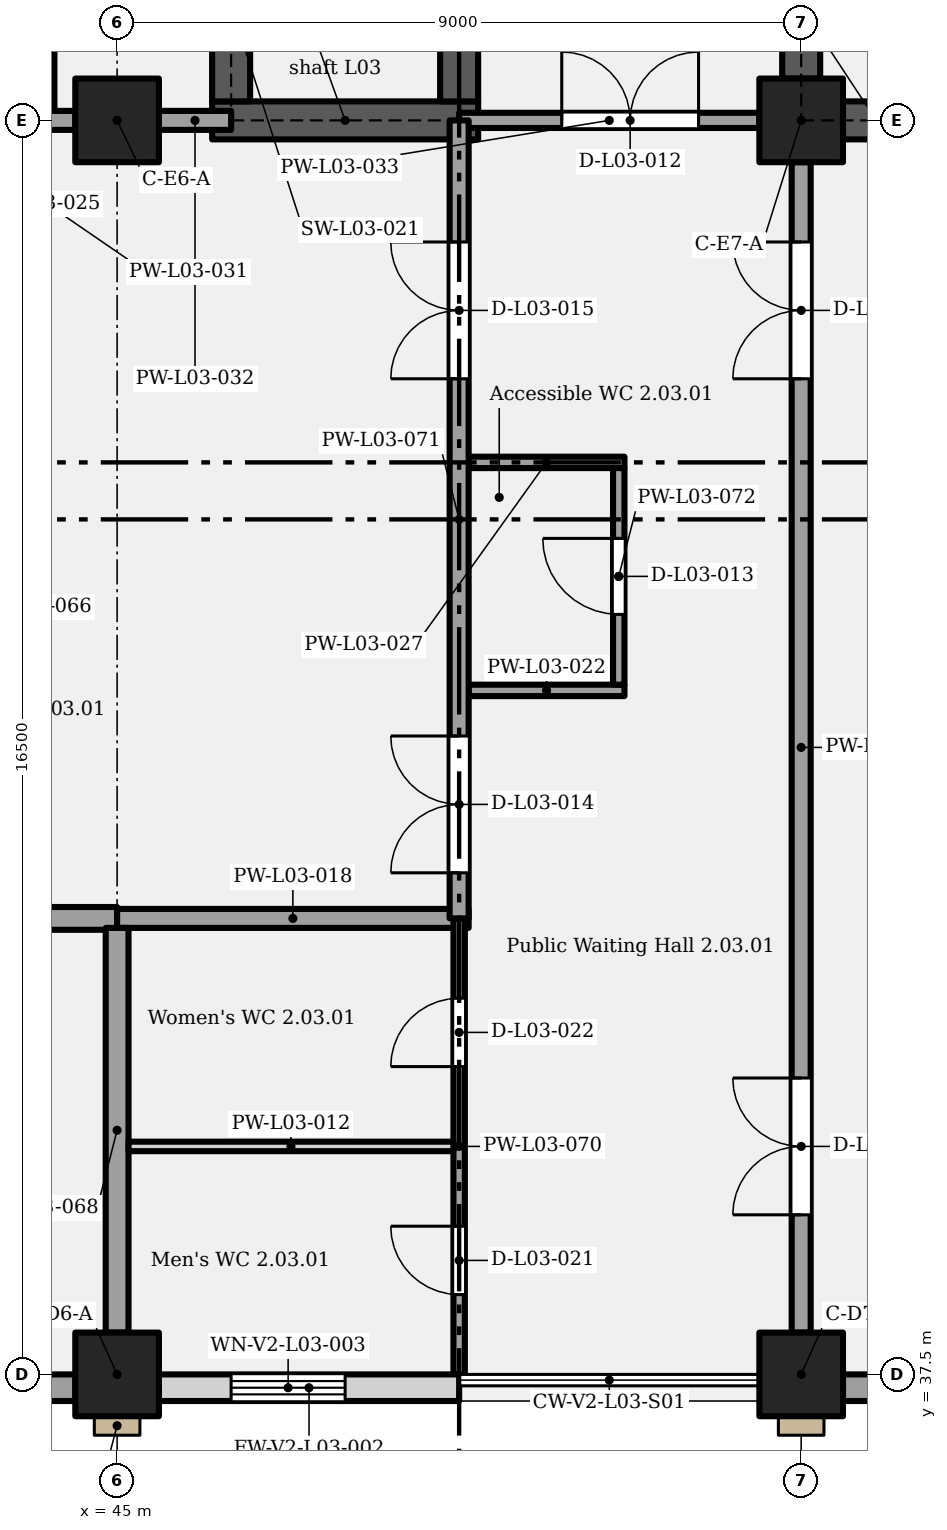
"""IFC4 building model, lengths in metres.
Left out: names, types, materials, properties, quantities, classifications, styles, units other than length and angle.
Written with IfcOpenShell. Run it as: python <this file> out.ifc"""

import sys

from ifc_helpers import new_model, si_unit, direction, frame, frame_2d, origin, origin_2d, place, context, subcontext, project, spatial, rectangle, extrude, element, fill, save


model = new_model("IFC4")
c1 = context("Model", 3, precision=1e-05, world=origin(), true_north=direction((0.0, 1.0)))
c2 = subcontext(c1, "Body", "Model", "MODEL_VIEW")
j1 = project(units=[si_unit("LENGTHUNIT", "METRE"), si_unit("PLANEANGLEUNIT", "RADIAN")], contexts=[c1])
p1 = place(None, origin())
s1 = spatial("IfcSite", under=j1, at=p1, CompositionType="ELEMENT")
p2 = place(p1, origin())
s2 = spatial("IfcBuilding", under=s1, at=p2, CompositionType="ELEMENT")
p3 = place(p2, frame((0.0, 0.0, 17.4)))
s3 = spatial("IfcBuildingStorey", under=s2, at=p3, CompositionType="ELEMENT", Elevation=17.4)
for number, where, z_axis, x_axis in (
    (1, (45.0, 37.5, 0.0), (0.0, 0.0, 1.0), (1.0, 0.0, 0.0)),
    (2, (54.0, 37.5, 0.0), (0.0, 0.0, 1.0), (1.0, 0.0, 0.0)),
    (3, (45.0, 54.0, 0.0), (0.0, 0.0, 1.0), (1.0, 0.0, 0.0)),
    (4, (54.0, 54.0, 0.0), (0.0, 0.0, 1.0), (1.0, 0.0, 0.0)),
):
    element("IfcColumn", number, at=place(p3, frame(where, z_axis=z_axis, x_axis=x_axis)), inside=s3, PredefinedType="COLUMN", context=c2, shape_type="SweptSolid", body=[
        extrude(rectangle(XDim=1.1, YDim=1.1, at=origin_2d()), origin(), (0.0, 0.0, 1.0), 5.4),
    ])
p4 = place(p3, frame((46.25, 54.0, 0.0), z_axis=(0.0, 0.0, 1.0), x_axis=(1.0, 0.0, 0.0)))
e5 = element("IfcWall", 5, at=p4, inside=s3, PredefinedType="SHEAR", context=c2, shape_type="SweptSolid", body=[
    extrude(rectangle(XDim=3.5, YDim=0.5, at=frame_2d((1.75, 0.0))), origin(), (0.0, 0.0, 1.0), 5.15),
])
p5 = place(p3, frame((54.55, 54.0, 0.0), z_axis=(0.0, 0.0, 1.0), x_axis=(1.0, 0.0, 0.0)))
e6 = element("IfcWall", 6, at=p5, inside=s3, PredefinedType="SHEAR", context=c2, shape_type="SweptSolid", body=[
    extrude(rectangle(XDim=2.7, YDim=0.5, at=frame_2d((1.35, 0.0))), origin(), (0.0, 0.0, 1.0), 5.15),
])
p6 = place(p3, frame((46.5, 54.25, 0.0), z_axis=(0.0, 0.0, 1.0), x_axis=(0.0, 1.0, 0.0)))
e7 = element("IfcWall", 7, at=p6, inside=s3, PredefinedType="SHEAR", context=c2, shape_type="SweptSolid", body=[
    extrude(rectangle(XDim=2.5, YDim=0.5, at=frame_2d((1.25, 0.0))), origin(), (0.0, 0.0, 1.0), 5.15),
])
p7 = place(p3, frame((49.5, 54.25, 0.0), z_axis=(0.0, 0.0, 1.0), x_axis=(0.0, 1.0, 0.0)))
e8 = element("IfcWall", 8, at=p7, inside=s3, PredefinedType="SHEAR", context=c2, shape_type="SweptSolid", body=[
    extrude(rectangle(XDim=11.5, YDim=0.5, at=frame_2d((5.75, 0.0))), origin(), (0.0, 0.0, 1.0), 5.15),
])
p8 = place(p7, frame((0.7, 0.0, 0.0)))
e9 = element("IfcOpeningElement", 9, at=p8, cuts=e8, PredefinedType="OPENING", context=c2, shape_type="SweptSolid", body=[
    extrude(rectangle(XDim=1.1, YDim=2.1, at=frame_2d((0.55, 1.05))), frame((0.0, 0.26, 0.0), z_axis=(0.0, -1.0, 0.0), x_axis=(1.0, 0.0, 0.0)), (0.0, 0.0, 1.0), 0.52),
])
p9 = place(p7, frame((4.35, 0.0, 0.0), z_axis=(0.0, 0.0, 1.0), x_axis=(-1.0, 0.0, 0.0)))
e10 = element("IfcOpeningElement", 10, at=p9, cuts=e8, PredefinedType="OPENING", context=c2, shape_type="SweptSolid", body=[
    extrude(rectangle(XDim=1.2, YDim=2.1, at=frame_2d((0.6, 1.05))), frame((0.0, 0.26, 0.0), z_axis=(0.0, -1.0, 0.0), x_axis=(1.0, 0.0, 0.0)), (0.0, 0.0, 1.0), 0.52),
])
p10 = place(p3, frame((54.0, 54.55, 0.0), z_axis=(0.0, 0.0, 1.0), x_axis=(0.0, 1.0, 0.0)))
e11 = element("IfcWall", 11, at=p10, inside=s3, PredefinedType="SHEAR", context=c2, shape_type="SweptSolid", body=[
    extrude(rectangle(XDim=11.0, YDim=0.5, at=frame_2d((5.5, 0.0))), origin(), (0.0, 0.0, 1.0), 5.15),
])
p11 = place(p10, frame((0.4, 0.0, 0.0)))
e12 = element("IfcOpeningElement", 12, at=p11, cuts=e11, PredefinedType="OPENING", context=c2, shape_type="SweptSolid", body=[
    extrude(rectangle(XDim=1.1, YDim=2.1, at=frame_2d((0.55, 1.05))), frame((0.0, 0.26, 0.0), z_axis=(0.0, -1.0, 0.0), x_axis=(1.0, 0.0, 0.0)), (0.0, 0.0, 1.0), 0.52),
])
p12 = place(p10, frame((2.85, 0.0, 0.0)))
e13 = element("IfcOpeningElement", 13, at=p12, cuts=e11, PredefinedType="OPENING", context=c2, shape_type="SweptSolid", body=[
    extrude(rectangle(XDim=1.2, YDim=2.1, at=frame_2d((0.6, 1.05))), frame((0.0, 0.26, 0.0), z_axis=(0.0, -1.0, 0.0), x_axis=(1.0, 0.0, 0.0)), (0.0, 0.0, 1.0), 0.52),
])
p13 = place(p3, frame((36.55, 37.325, 0.0), z_axis=(0.0, 0.0, 1.0), x_axis=(1.0, 0.0, 0.0)))
e14 = element("IfcWall", 14, at=p13, inside=s3, PredefinedType="SOLIDWALL", context=c2, shape_type="SweptSolid", body=[
    extrude(rectangle(XDim=7.9, YDim=0.35, at=frame_2d((3.95, 0.0))), origin(), (0.0, 0.0, 1.0), 5.15),
])
p14 = place(p13, frame((0.95, 0.0, 1.05)))
e15 = element("IfcOpeningElement", 15, at=p14, cuts=e14, PredefinedType="OPENING", context=c2, shape_type="SweptSolid", body=[
    extrude(rectangle(XDim=1.5, YDim=3.5, at=frame_2d((0.75, 1.75))), frame((0.0, 0.185, 0.0), z_axis=(0.0, -1.0, 0.0), x_axis=(1.0, 0.0, 0.0)), (0.0, 0.0, 1.0), 0.37),
])
p15 = place(p13, frame((5.45, 0.0, 1.05)))
e16 = element("IfcOpeningElement", 16, at=p15, cuts=e14, PredefinedType="OPENING", context=c2, shape_type="SweptSolid", body=[
    extrude(rectangle(XDim=1.5, YDim=3.5, at=frame_2d((0.75, 1.75))), frame((0.0, 0.185, 0.0), z_axis=(0.0, -1.0, 0.0), x_axis=(1.0, 0.0, 0.0)), (0.0, 0.0, 1.0), 0.37),
])
p16 = place(p3, frame((45.55, 37.325, 0.0), z_axis=(0.0, 0.0, 1.0), x_axis=(1.0, 0.0, 0.0)))
e17 = element("IfcWall", 17, at=p16, inside=s3, PredefinedType="SOLIDWALL", context=c2, shape_type="SweptSolid", body=[
    extrude(rectangle(XDim=3.95, YDim=0.35, at=frame_2d((1.975, 0.0))), origin(), (0.0, 0.0, 1.0), 5.15),
])
p17 = place(p16, frame((0.95, 0.0, 1.05)))
e18 = element("IfcOpeningElement", 18, at=p17, cuts=e17, PredefinedType="OPENING", context=c2, shape_type="SweptSolid", body=[
    extrude(rectangle(XDim=1.5, YDim=3.5, at=frame_2d((0.75, 1.75))), frame((0.0, 0.185, 0.0), z_axis=(0.0, -1.0, 0.0), x_axis=(1.0, 0.0, 0.0)), (0.0, 0.0, 1.0), 0.37),
])
p18 = place(p3, frame((54.55, 37.325, 0.0), z_axis=(0.0, 0.0, 1.0), x_axis=(1.0, 0.0, 0.0)))
e19 = element("IfcWall", 19, at=p18, inside=s3, PredefinedType="SOLIDWALL", context=c2, shape_type="SweptSolid", body=[
    extrude(rectangle(XDim=7.9, YDim=0.35, at=frame_2d((3.95, 0.0))), origin(), (0.0, 0.0, 1.0), 5.15),
])
p19 = place(p18, frame((0.95, 0.0, 1.05)))
e20 = element("IfcOpeningElement", 20, at=p19, cuts=e19, PredefinedType="OPENING", context=c2, shape_type="SweptSolid", body=[
    extrude(rectangle(XDim=1.5, YDim=3.5, at=frame_2d((0.75, 1.75))), frame((0.0, 0.185, 0.0), z_axis=(0.0, -1.0, 0.0), x_axis=(1.0, 0.0, 0.0)), (0.0, 0.0, 1.0), 0.37),
])
p20 = place(p18, frame((5.45, 0.0, 1.05)))
e21 = element("IfcOpeningElement", 21, at=p20, cuts=e19, PredefinedType="OPENING", context=c2, shape_type="SweptSolid", body=[
    extrude(rectangle(XDim=1.5, YDim=3.5, at=frame_2d((0.75, 1.75))), frame((0.0, 0.185, 0.0), z_axis=(0.0, -1.0, 0.0), x_axis=(1.0, 0.0, 0.0)), (0.0, 0.0, 1.0), 0.37),
])
p21 = place(p3, frame((45.15, 40.5, 0.0), z_axis=(0.0, 0.0, 1.0), x_axis=(1.0, 0.0, 0.0)))
e22 = element("IfcWall", 22, at=p21, inside=s3, PredefinedType="PARTITIONING", context=c2, shape_type="SweptSolid", body=[
    extrude(rectangle(XDim=4.275, YDim=0.125, at=frame_2d((2.138, 0.0))), origin(), (0.0, 0.0, 1.0), 5.15),
])
p22 = place(p3, frame((36.0, 43.5, 0.0), z_axis=(0.0, 0.0, 1.0), x_axis=(1.0, 0.0, 0.0)))
e23 = element("IfcWall", 23, at=p22, inside=s3, PredefinedType="PARTITIONING", context=c2, shape_type="SweptSolid", body=[
    extrude(rectangle(XDim=9.0, YDim=0.3, at=frame_2d((4.5, 0.0))), origin(), (0.0, 0.0, 1.0), 5.15),
])
p23 = place(p22, frame((1.35, 0.0, 0.0), z_axis=(0.0, 0.0, 1.0), x_axis=(-1.0, 0.0, 0.0)))
e24 = element("IfcOpeningElement", 24, at=p23, cuts=e23, PredefinedType="OPENING", context=c2, shape_type="SweptSolid", body=[
    extrude(rectangle(XDim=0.9, YDim=2.1, at=frame_2d((0.45, 1.05))), frame((0.0, 0.16, 0.0), z_axis=(0.0, -1.0, 0.0), x_axis=(1.0, 0.0, 0.0)), (0.0, 0.0, 1.0), 0.32),
])
p24 = place(p3, frame((45.0, 43.5, 0.0), z_axis=(0.0, 0.0, 1.0), x_axis=(1.0, 0.0, 0.0)))
e25 = element("IfcWall", 25, at=p24, inside=s3, PredefinedType="PARTITIONING", context=c2, shape_type="SweptSolid", body=[
    extrude(rectangle(XDim=4.625, YDim=0.25, at=frame_2d((2.312, 0.0))), origin(), (0.0, 0.0, 1.0), 5.15),
])
for number, where, z_axis, x_axis in (
    (26, (49.625, 46.5, 0.0), (0.0, 0.0, 1.0), (1.0, 0.0, 0.0)),
    (27, (49.625, 49.5, 0.0), (0.0, 0.0, 1.0), (1.0, 0.0, 0.0)),
):
    element("IfcWall", number, at=place(p3, frame(where, z_axis=z_axis, x_axis=x_axis)), inside=s3, PredefinedType="PARTITIONING", context=c2, shape_type="SweptSolid", body=[
        extrude(rectangle(XDim=2.05, YDim=0.15, at=frame_2d((1.025, 0.0))), origin(), (0.0, 0.0, 1.0), 5.15),
    ])
p25 = place(p3, frame((40.5, 54.0, 0.0), z_axis=(0.0, 0.0, 1.0), x_axis=(1.0, 0.0, 0.0)))
e28 = element("IfcWall", 28, at=p25, inside=s3, PredefinedType="PARTITIONING", context=c2, shape_type="SweptSolid", body=[
    extrude(rectangle(XDim=3.95, YDim=0.25, at=frame_2d((1.975, 0.0))), origin(), (0.0, 0.0, 1.0), 4.4),
])
p26 = place(p25, frame((2.3, 0.0, 0.0), z_axis=(0.0, 0.0, 1.0), x_axis=(-1.0, 0.0, 0.0)))
e29 = element("IfcOpeningElement", 29, at=p26, cuts=e28, PredefinedType="OPENING", context=c2, shape_type="SweptSolid", body=[
    extrude(rectangle(XDim=1.0, YDim=2.1, at=frame_2d((0.5, 1.05))), frame((0.0, 0.135, 0.0), z_axis=(0.0, -1.0, 0.0), x_axis=(1.0, 0.0, 0.0)), (0.0, 0.0, 1.0), 0.27),
])
p27 = place(p3, frame((45.55, 54.0, 0.0), z_axis=(0.0, 0.0, 1.0), x_axis=(1.0, 0.0, 0.0)))
e30 = element("IfcWall", 30, at=p27, inside=s3, PredefinedType="PARTITIONING", context=c2, shape_type="SweptSolid", body=[
    extrude(rectangle(XDim=0.95, YDim=0.25, at=frame_2d((0.475, 0.0))), origin(), (0.0, 0.0, 1.0), 4.4),
])
p28 = place(p3, frame((49.5, 54.0, 0.0), z_axis=(0.0, 0.0, 1.0), x_axis=(1.0, 0.0, 0.0)))
e31 = element("IfcWall", 31, at=p28, inside=s3, PredefinedType="PARTITIONING", context=c2, shape_type="SweptSolid", body=[
    extrude(rectangle(XDim=3.95, YDim=0.2, at=frame_2d((1.975, 0.0))), origin(), (0.0, 0.0, 1.0), 4.4),
])
p29 = place(p28, frame((1.35, 0.0, 0.0)))
e32 = element("IfcOpeningElement", 32, at=p29, cuts=e31, PredefinedType="OPENING", context=c2, shape_type="SweptSolid", body=[
    extrude(rectangle(XDim=1.8, YDim=2.1, at=frame_2d((0.9, 1.05))), frame((0.0, 0.11, 0.0), z_axis=(0.0, -1.0, 0.0), x_axis=(1.0, 0.0, 0.0)), (0.0, 0.0, 1.0), 0.22),
])
p30 = place(p3, frame((44.1, 54.125, 0.0), z_axis=(0.0, 0.0, 1.0), x_axis=(0.0, 1.0, 0.0)))
e33 = element("IfcWall", 33, at=p30, inside=s3, PredefinedType="PARTITIONING", context=c2, shape_type="SweptSolid", body=[
    extrude(rectangle(XDim=8.8, YDim=0.15, at=frame_2d((4.4, 0.0))), origin(), (0.0, 0.0, 1.0), 5.15),
])
p31 = place(p30, frame((0.875, 0.0, 0.0)))
e34 = element("IfcOpeningElement", 34, at=p31, cuts=e33, PredefinedType="OPENING", context=c2, shape_type="SweptSolid", body=[
    extrude(rectangle(XDim=1.0, YDim=2.1, at=frame_2d((0.5, 1.05))), frame((0.0, 0.085, 0.0), z_axis=(0.0, -1.0, 0.0), x_axis=(1.0, 0.0, 0.0)), (0.0, 0.0, 1.0), 0.17),
])
p32 = place(p30, frame((5.425, 0.0, 0.0)))
e35 = element("IfcOpeningElement", 35, at=p32, cuts=e33, PredefinedType="OPENING", context=c2, shape_type="SweptSolid", body=[
    extrude(rectangle(XDim=0.9, YDim=2.1, at=frame_2d((0.45, 1.05))), frame((0.0, 0.085, 0.0), z_axis=(0.0, -1.0, 0.0), x_axis=(1.0, 0.0, 0.0)), (0.0, 0.0, 1.0), 0.17),
])
p33 = place(p3, frame((45.0, 38.05, 0.0), z_axis=(0.0, 0.0, 1.0), x_axis=(0.0, 1.0, 0.0)))
e36 = element("IfcWall", 36, at=p33, inside=s3, PredefinedType="PARTITIONING", context=c2, shape_type="SweptSolid", body=[
    extrude(rectangle(XDim=5.325, YDim=0.3, at=frame_2d((2.663, 0.0))), origin(), (0.0, 0.0, 1.0), 4.2),
])
p34 = place(p3, frame((49.5, 37.5, 0.0), z_axis=(0.0, 0.0, 1.0), x_axis=(0.0, 1.0, 0.0)))
e37 = element("IfcWall", 37, at=p34, inside=s3, PredefinedType="PARTITIONING", context=c2, shape_type="SweptSolid", body=[
    extrude(rectangle(XDim=6.0, YDim=0.15, at=frame_2d((3.0, 0.0))), origin(), (0.0, 0.0, 1.0), 5.15),
])
p35 = place(p34, frame((1.05, 0.0, 0.0)))
e38 = element("IfcOpeningElement", 38, at=p35, cuts=e37, PredefinedType="OPENING", context=c2, shape_type="SweptSolid", body=[
    extrude(rectangle(XDim=0.9, YDim=2.1, at=frame_2d((0.45, 1.05))), frame((0.0, 0.085, 0.0), z_axis=(0.0, -1.0, 0.0), x_axis=(1.0, 0.0, 0.0)), (0.0, 0.0, 1.0), 0.17),
])
p36 = place(p34, frame((4.05, 0.0, 0.0)))
e39 = element("IfcOpeningElement", 39, at=p36, cuts=e37, PredefinedType="OPENING", context=c2, shape_type="SweptSolid", body=[
    extrude(rectangle(XDim=0.9, YDim=2.1, at=frame_2d((0.45, 1.05))), frame((0.0, 0.085, 0.0), z_axis=(0.0, -1.0, 0.0), x_axis=(1.0, 0.0, 0.0)), (0.0, 0.0, 1.0), 0.17),
])
p37 = place(p3, frame((49.5, 43.5, 0.0), z_axis=(0.0, 0.0, 1.0), x_axis=(0.0, 1.0, 0.0)))
e40 = element("IfcWall", 40, at=p37, inside=s3, PredefinedType="PARTITIONING", context=c2, shape_type="SweptSolid", body=[
    extrude(rectangle(XDim=10.5, YDim=0.25, at=frame_2d((5.25, 0.0))), origin(), (0.0, 0.0, 1.0), 5.15),
])
p38 = place(p37, frame((0.6, 0.0, 0.0)))
e41 = element("IfcOpeningElement", 41, at=p38, cuts=e40, PredefinedType="OPENING", context=c2, shape_type="SweptSolid", body=[
    extrude(rectangle(XDim=1.8, YDim=2.4, at=frame_2d((0.9, 1.2))), frame((0.0, 0.135, 0.0), z_axis=(0.0, -1.0, 0.0), x_axis=(1.0, 0.0, 0.0)), (0.0, 0.0, 1.0), 0.27),
])
p39 = place(p37, frame((7.1, 0.0, 0.0)))
e42 = element("IfcOpeningElement", 42, at=p39, cuts=e40, PredefinedType="OPENING", context=c2, shape_type="SweptSolid", body=[
    extrude(rectangle(XDim=1.8, YDim=2.4, at=frame_2d((0.9, 1.2))), frame((0.0, 0.135, 0.0), z_axis=(0.0, -1.0, 0.0), x_axis=(1.0, 0.0, 0.0)), (0.0, 0.0, 1.0), 0.27),
])
p40 = place(p3, frame((51.6, 46.575, 0.0), z_axis=(0.0, 0.0, 1.0), x_axis=(0.0, 1.0, 0.0)))
e43 = element("IfcWall", 43, at=p40, inside=s3, PredefinedType="PARTITIONING", context=c2, shape_type="SweptSolid", body=[
    extrude(rectangle(XDim=2.85, YDim=0.15, at=frame_2d((1.425, 0.0))), origin(), (0.0, 0.0, 1.0), 5.15),
])
p41 = place(p40, frame((0.925, 0.0, 0.0)))
e44 = element("IfcOpeningElement", 44, at=p41, cuts=e43, PredefinedType="OPENING", context=c2, shape_type="SweptSolid", body=[
    extrude(rectangle(XDim=1.0, YDim=2.1, at=frame_2d((0.5, 1.05))), frame((0.0, 0.085, 0.0), z_axis=(0.0, -1.0, 0.0), x_axis=(1.0, 0.0, 0.0)), (0.0, 0.0, 1.0), 0.17),
])
p42 = place(p3, frame((54.0, 38.05, 0.0), z_axis=(0.0, 0.0, 1.0), x_axis=(0.0, 1.0, 0.0)))
e45 = element("IfcWall", 45, at=p42, inside=s3, PredefinedType="PARTITIONING", context=c2, shape_type="SweptSolid", body=[
    extrude(rectangle(XDim=15.4, YDim=0.25, at=frame_2d((7.7, 0.0))), origin(), (0.0, 0.0, 1.0), 4.2),
])
p43 = place(p42, frame((1.55, 0.0, 0.0)))
e46 = element("IfcOpeningElement", 46, at=p43, cuts=e45, PredefinedType="OPENING", context=c2, shape_type="SweptSolid", body=[
    extrude(rectangle(XDim=1.8, YDim=2.4, at=frame_2d((0.9, 1.2))), frame((0.0, 0.135, 0.0), z_axis=(0.0, -1.0, 0.0), x_axis=(1.0, 0.0, 0.0)), (0.0, 0.0, 1.0), 0.27),
])
p44 = place(p42, frame((12.55, 0.0, 0.0)))
e47 = element("IfcOpeningElement", 47, at=p44, cuts=e45, PredefinedType="OPENING", context=c2, shape_type="SweptSolid", body=[
    extrude(rectangle(XDim=1.8, YDim=2.4, at=frame_2d((0.9, 1.2))), frame((0.0, 0.135, 0.0), z_axis=(0.0, -1.0, 0.0), x_axis=(1.0, 0.0, 0.0)), (0.0, 0.0, 1.0), 0.27),
])
p45 = place(p17, origin())
e48 = element("IfcWindow", 48, at=p45, inside=s3, PartitioningType="SINGLE_PANEL", PredefinedType="WINDOW", context=c2, shape_type="SweptSolid", body=[
    extrude(rectangle(XDim=1.5, YDim=3.5, at=frame_2d((0.75, 1.75))), frame((0.0, 0.03, 0.0), z_axis=(0.0, -1.0, 0.0), x_axis=(1.0, 0.0, 0.0)), (0.0, 0.0, 1.0), 0.06),
])
fill(e18, e48)
p46 = place(p29, origin())
e49 = element("IfcDoor", 49, at=p46, inside=s3, OperationType="DOUBLE_DOOR_SINGLE_SWING", PredefinedType="DOOR", context=c2, shape_type="SweptSolid", body=[
    extrude(rectangle(XDim=1.8, YDim=2.1, at=frame_2d((0.9, 1.05))), frame((0.0, 0.025, 0.0), z_axis=(0.0, -1.0, 0.0), x_axis=(1.0, 0.0, 0.0)), (0.0, 0.0, 1.0), 0.05),
])
fill(e32, e49)
p47 = place(p41, origin())
e50 = element("IfcDoor", 50, at=p47, inside=s3, OperationType="SINGLE_SWING_RIGHT", PredefinedType="DOOR", context=c2, shape_type="SweptSolid", body=[
    extrude(rectangle(XDim=1.0, YDim=2.1, at=frame_2d((0.5, 1.05))), frame((0.0, 0.025, 0.0), z_axis=(0.0, -1.0, 0.0), x_axis=(1.0, 0.0, 0.0)), (0.0, 0.0, 1.0), 0.05),
])
fill(e44, e50)
p48 = place(p38, origin())
e51 = element("IfcDoor", 51, at=p48, inside=s3, OperationType="DOUBLE_DOOR_SINGLE_SWING", PredefinedType="DOOR", context=c2, shape_type="SweptSolid", body=[
    extrude(rectangle(XDim=1.8, YDim=2.4, at=frame_2d((0.9, 1.2))), frame((0.0, 0.025, 0.0), z_axis=(0.0, -1.0, 0.0), x_axis=(1.0, 0.0, 0.0)), (0.0, 0.0, 1.0), 0.05),
])
fill(e41, e51)
p49 = place(p39, origin())
e52 = element("IfcDoor", 52, at=p49, inside=s3, OperationType="DOUBLE_DOOR_SINGLE_SWING", PredefinedType="DOOR", context=c2, shape_type="SweptSolid", body=[
    extrude(rectangle(XDim=1.8, YDim=2.4, at=frame_2d((0.9, 1.2))), frame((0.0, 0.025, 0.0), z_axis=(0.0, -1.0, 0.0), x_axis=(1.0, 0.0, 0.0)), (0.0, 0.0, 1.0), 0.05),
])
fill(e42, e52)
p50 = place(p35, origin())
e53 = element("IfcDoor", 53, at=p50, inside=s3, OperationType="SINGLE_SWING_RIGHT", PredefinedType="DOOR", context=c2, shape_type="SweptSolid", body=[
    extrude(rectangle(XDim=0.9, YDim=2.1, at=frame_2d((0.45, 1.05))), frame((0.0, 0.025, 0.0), z_axis=(0.0, -1.0, 0.0), x_axis=(1.0, 0.0, 0.0)), (0.0, 0.0, 1.0), 0.05),
])
fill(e38, e53)
p51 = place(p36, origin())
e54 = element("IfcDoor", 54, at=p51, inside=s3, OperationType="SINGLE_SWING_LEFT", PredefinedType="DOOR", context=c2, shape_type="SweptSolid", body=[
    extrude(rectangle(XDim=0.9, YDim=2.1, at=frame_2d((0.45, 1.05))), frame((0.0, 0.025, 0.0), z_axis=(0.0, -1.0, 0.0), x_axis=(1.0, 0.0, 0.0)), (0.0, 0.0, 1.0), 0.05),
])
fill(e39, e54)
p52 = place(p43, origin())
e55 = element("IfcDoor", 55, at=p52, inside=s3, OperationType="DOUBLE_DOOR_SINGLE_SWING", PredefinedType="DOOR", context=c2, shape_type="SweptSolid", body=[
    extrude(rectangle(XDim=1.8, YDim=2.4, at=frame_2d((0.9, 1.2))), frame((0.0, 0.025, 0.0), z_axis=(0.0, -1.0, 0.0), x_axis=(1.0, 0.0, 0.0)), (0.0, 0.0, 1.0), 0.05),
])
fill(e46, e55)
p53 = place(p44, origin())
e56 = element("IfcDoor", 56, at=p53, inside=s3, OperationType="DOUBLE_DOOR_SINGLE_SWING", PredefinedType="DOOR", context=c2, shape_type="SweptSolid", body=[
    extrude(rectangle(XDim=1.8, YDim=2.4, at=frame_2d((0.9, 1.2))), frame((0.0, 0.025, 0.0), z_axis=(0.0, -1.0, 0.0), x_axis=(1.0, 0.0, 0.0)), (0.0, 0.0, 1.0), 0.05),
])
fill(e47, e56)
save(model, sys.argv[1])
